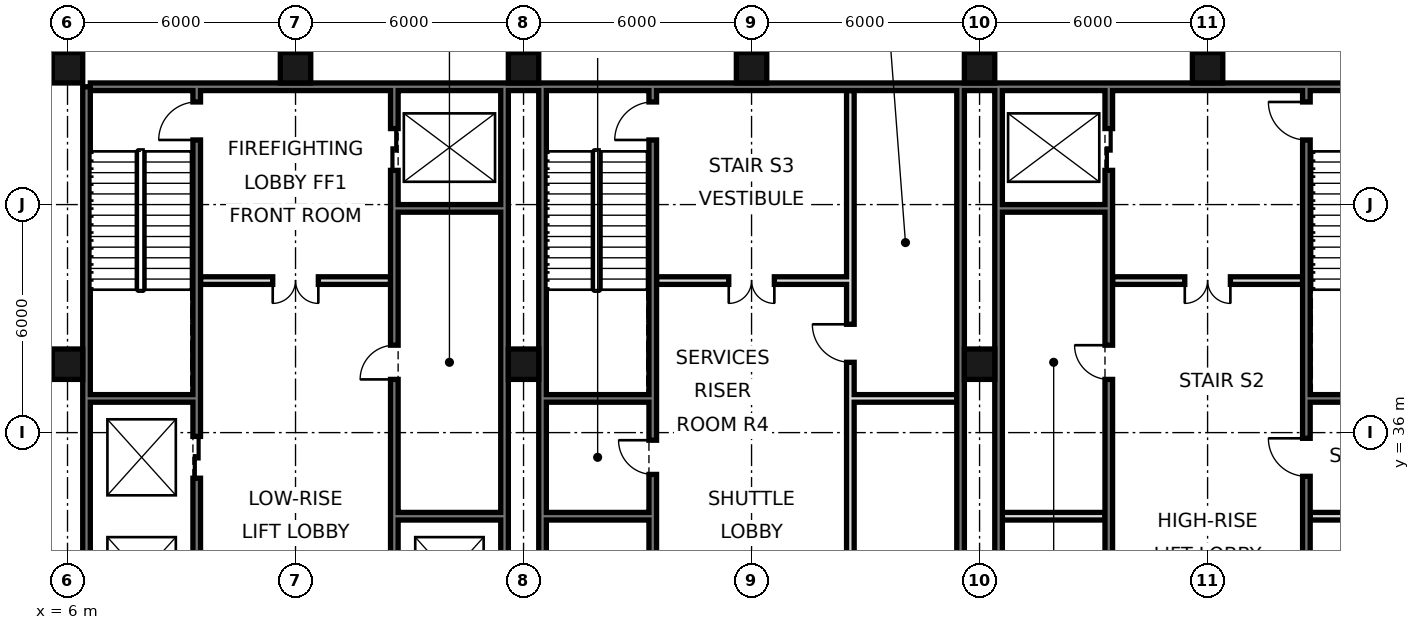
"""IFC4 building model, lengths in metres.
Left out: names, types, materials, properties, quantities, classifications, styles, units other than length and angle.
Written with IfcOpenShell. Run it as: python <this file> out.ifc"""

import sys

from ifc_helpers import new_model, si_unit, direction, frame, frame_2d, origin, origin_2d, place, context, subcontext, project, spatial, rectangle, hollow_rectangle, extrude, element, fill, save


model = new_model("IFC4")
c1 = context("Model", 3, precision=1e-05, world=origin(), true_north=direction((0.0, 1.0)))
c2 = subcontext(c1, "Body", "Model", "MODEL_VIEW")
j1 = project(units=[si_unit("LENGTHUNIT", "METRE"), si_unit("PLANEANGLEUNIT", "RADIAN")], contexts=[c1])
p1 = place(None, origin())
s1 = spatial("IfcSite", under=j1, at=p1, CompositionType="ELEMENT")
p2 = place(p1, origin())
s2 = spatial("IfcBuilding", under=s1, at=p2, CompositionType="ELEMENT")
p3 = place(p2, frame((0.0, 0.0, 34.8)))
s3 = spatial("IfcBuildingStorey", under=s2, at=p3, CompositionType="ELEMENT", Elevation=34.8)
for number, where, z_axis, x_axis in (
    (1, (6.0, 37.8, 0.0), (0.0, 0.0, 1.0), (1.0, 0.0, 0.0)),
    (2, (6.0, 45.6, 0.0), (0.0, 0.0, 1.0), (1.0, 0.0, 0.0)),
    (3, (12.0, 45.6, 0.0), (0.0, 0.0, 1.0), (1.0, 0.0, 0.0)),
    (4, (18.0, 37.8, 0.0), (0.0, 0.0, 1.0), (1.0, 0.0, 0.0)),
    (5, (18.0, 45.6, 0.0), (0.0, 0.0, 1.0), (1.0, 0.0, 0.0)),
    (6, (24.0, 45.6, 0.0), (0.0, 0.0, 1.0), (1.0, 0.0, 0.0)),
    (7, (30.0, 37.8, 0.0), (0.0, 0.0, 1.0), (1.0, 0.0, 0.0)),
    (8, (30.0, 45.6, 0.0), (0.0, 0.0, 1.0), (1.0, 0.0, 0.0)),
    (9, (36.0, 45.6, 0.0), (0.0, 0.0, 1.0), (1.0, 0.0, 0.0)),
):
    element("IfcColumn", number, at=place(p3, frame(where, z_axis=z_axis, x_axis=x_axis)), inside=s3, PredefinedType="COLUMN", context=c2, shape_type="SweptSolid", body=[
        extrude(hollow_rectangle(XDim=0.8, YDim=0.8, WallThickness=0.07, at=origin_2d()), origin(), (0.0, 0.0, 1.0), 4.8),
    ])
p4 = place(p3, frame((6.5, 21.6, 0.0), z_axis=(0.0, 0.0, 1.0), x_axis=(0.0, 1.0, 0.0)))
e10 = element("IfcWall", 10, at=p4, inside=s3, PredefinedType="SOLIDWALL", context=c2, shape_type="SweptSolid", body=[
    extrude(rectangle(XDim=23.5, YDim=0.2, at=frame_2d((11.75, 0.0))), origin(), (0.0, 0.0, 1.0), 4.4),
])
p5 = place(p3, frame((6.6, 45.1, 0.0), z_axis=(0.0, 0.0, 1.0), x_axis=(1.0, 0.0, 0.0)))
e11 = element("IfcWall", 11, at=p5, inside=s3, PredefinedType="SOLIDWALL", context=c2, shape_type="SweptSolid", body=[
    extrude(rectangle(XDim=34.8, YDim=0.2, at=frame_2d((17.4, 0.0))), origin(), (0.0, 0.0, 1.0), 4.4),
])
for number, where, z_axis, x_axis in (
    (12, (17.5, 27.6, 0.0), (0.0, 0.0, 1.0), (0.0, 1.0, 0.0)),
    (13, (18.5, 27.6, 0.0), (0.0, 0.0, 1.0), (0.0, 1.0, 0.0)),
    (14, (29.5, 27.6, 0.0), (0.0, 0.0, 1.0), (0.0, 1.0, 0.0)),
    (15, (30.5, 27.6, 0.0), (0.0, 0.0, 1.0), (0.0, 1.0, 0.0)),
):
    element("IfcWall", number, at=place(p3, frame(where, z_axis=z_axis, x_axis=x_axis)), inside=s3, PredefinedType="SOLIDWALL", context=c2, shape_type="SweptSolid", body=[
        extrude(rectangle(XDim=17.5, YDim=0.2, at=frame_2d((8.75, 0.0))), origin(), (0.0, 0.0, 1.0), 4.4),
    ])
p6 = place(p3, frame((14.6, 27.5, 0.0), z_axis=(0.0, 0.0, 1.0), x_axis=(0.0, 1.0, 0.0)))
e16 = element("IfcWall", 16, at=p6, inside=s3, PredefinedType="SOLIDWALL", context=c2, shape_type="SweptSolid", body=[
    extrude(rectangle(XDim=17.5, YDim=0.2, at=frame_2d((8.75, 0.0))), origin(), (0.0, 0.0, 1.0), 4.4),
])
p7 = place(p6, frame((1.1, 0.0, 0.0)))
e17 = element("IfcOpeningElement", 17, at=p7, cuts=e16, PredefinedType="OPENING", context=c2, shape_type="SweptSolid", body=[
    extrude(rectangle(XDim=1.1, YDim=2.1, at=frame_2d((0.55, 1.05))), frame((0.0, 0.11, 0.0), z_axis=(0.0, -1.0, 0.0), x_axis=(1.0, 0.0, 0.0)), (0.0, 0.0, 1.0), 0.22),
])
p8 = place(p6, frame((4.2, 0.0, 0.0)))
e18 = element("IfcOpeningElement", 18, at=p8, cuts=e16, PredefinedType="OPENING", context=c2, shape_type="SweptSolid", body=[
    extrude(rectangle(XDim=1.1, YDim=2.1, at=frame_2d((0.55, 1.05))), frame((0.0, 0.11, 0.0), z_axis=(0.0, -1.0, 0.0), x_axis=(1.0, 0.0, 0.0)), (0.0, 0.0, 1.0), 0.22),
])
p9 = place(p6, frame((15.4, 0.0, 0.0)))
e19 = element("IfcOpeningElement", 19, at=p9, cuts=e16, PredefinedType="OPENING", context=c2, shape_type="SweptSolid", body=[
    extrude(rectangle(XDim=1.1, YDim=2.1, at=frame_2d((0.55, 1.05))), frame((0.0, 0.11, 0.0), z_axis=(0.0, -1.0, 0.0), x_axis=(1.0, 0.0, 0.0)), (0.0, 0.0, 1.0), 0.22),
])
p10 = place(p6, frame((9.9, 0.0, 0.0)))
e20 = element("IfcOpeningElement", 20, at=p10, cuts=e16, PredefinedType="OPENING", context=c2, shape_type="SweptSolid", body=[
    extrude(rectangle(XDim=0.9, YDim=2.1, at=frame_2d((0.45, 1.05))), frame((0.0, 0.11, 0.0), z_axis=(0.0, -1.0, 0.0), x_axis=(1.0, 0.0, 0.0)), (0.0, 0.0, 1.0), 0.22),
])
p11 = place(p3, frame((21.4, 27.5, 0.0), z_axis=(0.0, 0.0, 1.0), x_axis=(0.0, 1.0, 0.0)))
e21 = element("IfcWall", 21, at=p11, inside=s3, PredefinedType="SOLIDWALL", context=c2, shape_type="SweptSolid", body=[
    extrude(rectangle(XDim=17.5, YDim=0.2, at=frame_2d((8.75, 0.0))), origin(), (0.0, 0.0, 1.0), 4.4),
])
p12 = place(p11, frame((16.2, 0.0, 0.0)))
e22 = element("IfcOpeningElement", 22, at=p12, cuts=e21, PredefinedType="OPENING", context=c2, shape_type="SweptSolid", body=[
    extrude(rectangle(XDim=1.0, YDim=2.1, at=frame_2d((0.5, 1.05))), frame((0.0, 0.11, 0.0), z_axis=(0.0, -1.0, 0.0), x_axis=(1.0, 0.0, 0.0)), (0.0, 0.0, 1.0), 0.22),
])
p13 = place(p11, frame((7.4, 0.0, 0.0)))
e23 = element("IfcOpeningElement", 23, at=p13, cuts=e21, PredefinedType="OPENING", context=c2, shape_type="SweptSolid", body=[
    extrude(rectangle(XDim=0.9, YDim=2.1, at=frame_2d((0.45, 1.05))), frame((0.0, 0.11, 0.0), z_axis=(0.0, -1.0, 0.0), x_axis=(1.0, 0.0, 0.0)), (0.0, 0.0, 1.0), 0.22),
])
p14 = place(p3, frame((26.6, 27.5, 0.0), z_axis=(0.0, 0.0, 1.0), x_axis=(0.0, 1.0, 0.0)))
e24 = element("IfcWall", 24, at=p14, inside=s3, PredefinedType="SOLIDWALL", context=c2, shape_type="SweptSolid", body=[
    extrude(rectangle(XDim=17.5, YDim=0.2, at=frame_2d((8.75, 0.0))), origin(), (0.0, 0.0, 1.0), 4.4),
])
p15 = place(p14, frame((4.3, 0.0, 0.0)))
e25 = element("IfcOpeningElement", 25, at=p15, cuts=e24, PredefinedType="OPENING", context=c2, shape_type="SweptSolid", body=[
    extrude(rectangle(XDim=0.9, YDim=2.1, at=frame_2d((0.45, 1.05))), frame((0.0, 0.11, 0.0), z_axis=(0.0, -1.0, 0.0), x_axis=(1.0, 0.0, 0.0)), (0.0, 0.0, 1.0), 0.22),
])
p16 = place(p14, frame((10.35, 0.0, 0.0)))
e26 = element("IfcOpeningElement", 26, at=p16, cuts=e24, PredefinedType="OPENING", context=c2, shape_type="SweptSolid", body=[
    extrude(rectangle(XDim=1.0, YDim=2.1, at=frame_2d((0.5, 1.05))), frame((0.0, 0.11, 0.0), z_axis=(0.0, -1.0, 0.0), x_axis=(1.0, 0.0, 0.0)), (0.0, 0.0, 1.0), 0.22),
])
p17 = place(p3, frame((33.4, 27.5, 0.0), z_axis=(0.0, 0.0, 1.0), x_axis=(0.0, 1.0, 0.0)))
e27 = element("IfcWall", 27, at=p17, inside=s3, PredefinedType="SOLIDWALL", context=c2, shape_type="SweptSolid", body=[
    extrude(rectangle(XDim=17.5, YDim=0.2, at=frame_2d((8.75, 0.0))), origin(), (0.0, 0.0, 1.0), 4.4),
])
p18 = place(p17, frame((15.4, 0.0, 0.0)))
e28 = element("IfcOpeningElement", 28, at=p18, cuts=e27, PredefinedType="OPENING", context=c2, shape_type="SweptSolid", body=[
    extrude(rectangle(XDim=1.1, YDim=2.1, at=frame_2d((0.55, 1.05))), frame((0.0, 0.11, 0.0), z_axis=(0.0, -1.0, 0.0), x_axis=(1.0, 0.0, 0.0)), (0.0, 0.0, 1.0), 0.22),
])
p19 = place(p17, frame((2.7, 0.0, 0.0)))
e29 = element("IfcOpeningElement", 29, at=p19, cuts=e27, PredefinedType="OPENING", context=c2, shape_type="SweptSolid", body=[
    extrude(rectangle(XDim=1.0, YDim=2.1, at=frame_2d((0.5, 1.05))), frame((0.0, 0.11, 0.0), z_axis=(0.0, -1.0, 0.0), x_axis=(1.0, 0.0, 0.0)), (0.0, 0.0, 1.0), 0.22),
])
p20 = place(p17, frame((9.9, 0.0, 0.0)))
e30 = element("IfcOpeningElement", 30, at=p20, cuts=e27, PredefinedType="OPENING", context=c2, shape_type="SweptSolid", body=[
    extrude(rectangle(XDim=0.9, YDim=2.1, at=frame_2d((0.45, 1.05))), frame((0.0, 0.11, 0.0), z_axis=(0.0, -1.0, 0.0), x_axis=(1.0, 0.0, 0.0)), (0.0, 0.0, 1.0), 0.22),
])
p21 = place(p3, frame((38.6, 21.6, 0.0), z_axis=(0.0, 0.0, 1.0), x_axis=(0.0, 1.0, 0.0)))
e31 = element("IfcWall", 31, at=p21, inside=s3, PredefinedType="SOLIDWALL", context=c2, shape_type="SweptSolid", body=[
    extrude(rectangle(XDim=23.4, YDim=0.2, at=frame_2d((11.7, 0.0))), origin(), (0.0, 0.0, 1.0), 4.4),
])
p22 = place(p21, frame((8.6, 0.0, 0.0)))
e32 = element("IfcOpeningElement", 32, at=p22, cuts=e31, PredefinedType="OPENING", context=c2, shape_type="SweptSolid", body=[
    extrude(rectangle(XDim=1.0, YDim=2.1, at=frame_2d((0.5, 1.05))), frame((0.0, 0.11, 0.0), z_axis=(0.0, -1.0, 0.0), x_axis=(1.0, 0.0, 0.0)), (0.0, 0.0, 1.0), 0.22),
])
p23 = place(p21, frame((13.25, 0.0, 0.0)))
e33 = element("IfcOpeningElement", 33, at=p23, cuts=e31, PredefinedType="OPENING", context=c2, shape_type="SweptSolid", body=[
    extrude(rectangle(XDim=1.0, YDim=2.1, at=frame_2d((0.5, 1.05))), frame((0.0, 0.11, 0.0), z_axis=(0.0, -1.0, 0.0), x_axis=(1.0, 0.0, 0.0)), (0.0, 0.0, 1.0), 0.22),
])
p24 = place(p21, frame((22.1, 0.0, 0.0)))
e34 = element("IfcOpeningElement", 34, at=p24, cuts=e31, PredefinedType="OPENING", context=c2, shape_type="SweptSolid", body=[
    extrude(rectangle(XDim=1.0, YDim=2.1, at=frame_2d((0.5, 1.05))), frame((0.0, 0.11, 0.0), z_axis=(0.0, -1.0, 0.0), x_axis=(1.0, 0.0, 0.0)), (0.0, 0.0, 1.0), 0.22),
])
p25 = place(p21, frame((0.175, 0.0, 0.0)))
e35 = element("IfcOpeningElement", 35, at=p25, cuts=e31, PredefinedType="OPENING", context=c2, shape_type="SweptSolid", body=[
    extrude(rectangle(XDim=0.9, YDim=2.1, at=frame_2d((0.45, 1.05))), frame((0.0, 0.11, 0.0), z_axis=(0.0, -1.0, 0.0), x_axis=(1.0, 0.0, 0.0)), (0.0, 0.0, 1.0), 0.22),
])
p26 = place(p3, frame((9.4, 21.6, 0.0), z_axis=(0.0, 0.0, 1.0), x_axis=(0.0, 1.0, 0.0)))
e36 = element("IfcWall", 36, at=p26, inside=s3, PredefinedType="SOLIDWALL", context=c2, shape_type="SweptSolid", body=[
    extrude(rectangle(XDim=23.4, YDim=0.2, at=frame_2d((11.7, 0.0))), origin(), (0.0, 0.0, 1.0), 4.4),
])
p27 = place(p26, frame((7.0, 0.0, 0.0)))
e37 = element("IfcOpeningElement", 37, at=p27, cuts=e36, PredefinedType="OPENING", context=c2, shape_type="SweptSolid", body=[
    extrude(rectangle(XDim=1.1, YDim=2.1, at=frame_2d((0.55, 1.05))), frame((0.0, 0.11, 0.0), z_axis=(0.0, -1.0, 0.0), x_axis=(1.0, 0.0, 0.0)), (0.0, 0.0, 1.0), 0.22),
])
p28 = place(p26, frame((10.1, 0.0, 0.0)))
e38 = element("IfcOpeningElement", 38, at=p28, cuts=e36, PredefinedType="OPENING", context=c2, shape_type="SweptSolid", body=[
    extrude(rectangle(XDim=1.1, YDim=2.1, at=frame_2d((0.55, 1.05))), frame((0.0, 0.11, 0.0), z_axis=(0.0, -1.0, 0.0), x_axis=(1.0, 0.0, 0.0)), (0.0, 0.0, 1.0), 0.22),
])
p29 = place(p26, frame((13.2, 0.0, 0.0)))
e39 = element("IfcOpeningElement", 39, at=p29, cuts=e36, PredefinedType="OPENING", context=c2, shape_type="SweptSolid", body=[
    extrude(rectangle(XDim=1.1, YDim=2.1, at=frame_2d((0.55, 1.05))), frame((0.0, 0.11, 0.0), z_axis=(0.0, -1.0, 0.0), x_axis=(1.0, 0.0, 0.0)), (0.0, 0.0, 1.0), 0.22),
])
p30 = place(p26, frame((22.1, 0.0, 0.0)))
e40 = element("IfcOpeningElement", 40, at=p30, cuts=e36, PredefinedType="OPENING", context=c2, shape_type="SweptSolid", body=[
    extrude(rectangle(XDim=1.0, YDim=2.1, at=frame_2d((0.5, 1.05))), frame((0.0, 0.11, 0.0), z_axis=(0.0, -1.0, 0.0), x_axis=(1.0, 0.0, 0.0)), (0.0, 0.0, 1.0), 0.22),
])
p31 = place(p26, frame((0.175, 0.0, 0.0)))
e41 = element("IfcOpeningElement", 41, at=p31, cuts=e36, PredefinedType="OPENING", context=c2, shape_type="SweptSolid", body=[
    extrude(rectangle(XDim=0.9, YDim=2.1, at=frame_2d((0.45, 1.05))), frame((0.0, 0.11, 0.0), z_axis=(0.0, -1.0, 0.0), x_axis=(1.0, 0.0, 0.0)), (0.0, 0.0, 1.0), 0.22),
])
for number, where, z_axis, x_axis in (
    (42, (14.7, 33.8, 0.0), (0.0, 0.0, 1.0), (1.0, 0.0, 0.0)),
    (43, (18.6, 33.8, 0.0), (0.0, 0.0, 1.0), (1.0, 0.0, 0.0)),
    (44, (30.6, 33.8, 0.0), (0.0, 0.0, 1.0), (1.0, 0.0, 0.0)),
):
    element("IfcWall", number, at=place(p3, frame(where, z_axis=z_axis, x_axis=x_axis)), inside=s3, PredefinedType="SOLIDWALL", context=c2, shape_type="SweptSolid", body=[
        extrude(rectangle(XDim=2.7, YDim=0.2, at=frame_2d((1.35, 0.0))), origin(), (0.0, 0.0, 1.0), 4.4),
    ])
p32 = place(p3, frame((38.7, 33.8, 0.0), z_axis=(0.0, 0.0, 1.0), x_axis=(1.0, 0.0, 0.0)))
e45 = element("IfcWall", 45, at=p32, inside=s3, PredefinedType="PARTITIONING", context=c2, shape_type="SweptSolid", body=[
    extrude(rectangle(XDim=2.7, YDim=0.2, at=frame_2d((1.35, 0.0))), origin(), (0.0, 0.0, 1.0), 4.4),
])
for number, where, z_axis, x_axis in (
    (46, (18.6, 36.9, 0.0), (0.0, 0.0, 1.0), (1.0, 0.0, 0.0)),
    (47, (26.7, 36.9, 0.0), (0.0, 0.0, 1.0), (1.0, 0.0, 0.0)),
    (48, (38.7, 36.9, 0.0), (0.0, 0.0, 1.0), (1.0, 0.0, 0.0)),
    (49, (6.6, 36.9, 0.0), (0.0, 0.0, 1.0), (1.0, 0.0, 0.0)),
):
    element("IfcWall", number, at=place(p3, frame(where, z_axis=z_axis, x_axis=x_axis)), inside=s3, PredefinedType="SOLIDWALL", context=c2, shape_type="SweptSolid", body=[
        extrude(rectangle(XDim=2.7, YDim=0.2, at=frame_2d((1.35, 0.0))), origin(), (0.0, 0.0, 1.0), 4.4),
    ])
p33 = place(p3, frame((21.5, 40.0, 0.0), z_axis=(0.0, 0.0, 1.0), x_axis=(1.0, 0.0, 0.0)))
e50 = element("IfcWall", 50, at=p33, inside=s3, PredefinedType="PARTITIONING", context=c2, shape_type="SweptSolid", body=[
    extrude(rectangle(XDim=5.0, YDim=0.2, at=frame_2d((2.5, 0.0))), origin(), (0.0, 0.0, 1.0), 4.4),
])
p34 = place(p33, frame((1.9, 0.0, 0.0)))
e51 = element("IfcOpeningElement", 51, at=p34, cuts=e50, PredefinedType="OPENING", context=c2, shape_type="SweptSolid", body=[
    extrude(rectangle(XDim=1.2, YDim=2.1, at=frame_2d((0.6, 1.05))), frame((0.0, 0.11, 0.0), z_axis=(0.0, -1.0, 0.0), x_axis=(1.0, 0.0, 0.0)), (0.0, 0.0, 1.0), 0.22),
])
p35 = place(p3, frame((33.5, 40.0, 0.0), z_axis=(0.0, 0.0, 1.0), x_axis=(1.0, 0.0, 0.0)))
e52 = element("IfcWall", 52, at=p35, inside=s3, PredefinedType="PARTITIONING", context=c2, shape_type="SweptSolid", body=[
    extrude(rectangle(XDim=5.0, YDim=0.2, at=frame_2d((2.5, 0.0))), origin(), (0.0, 0.0, 1.0), 4.4),
])
p36 = place(p35, frame((1.9, 0.0, 0.0)))
e53 = element("IfcOpeningElement", 53, at=p36, cuts=e52, PredefinedType="OPENING", context=c2, shape_type="SweptSolid", body=[
    extrude(rectangle(XDim=1.2, YDim=2.1, at=frame_2d((0.6, 1.05))), frame((0.0, 0.11, 0.0), z_axis=(0.0, -1.0, 0.0), x_axis=(1.0, 0.0, 0.0)), (0.0, 0.0, 1.0), 0.22),
])
p37 = place(p3, frame((9.5, 40.0, 0.0), z_axis=(0.0, 0.0, 1.0), x_axis=(1.0, 0.0, 0.0)))
e54 = element("IfcWall", 54, at=p37, inside=s3, PredefinedType="PARTITIONING", context=c2, shape_type="SweptSolid", body=[
    extrude(rectangle(XDim=5.0, YDim=0.2, at=frame_2d((2.5, 0.0))), origin(), (0.0, 0.0, 1.0), 4.4),
])
p38 = place(p37, frame((1.9, 0.0, 0.0)))
e55 = element("IfcOpeningElement", 55, at=p38, cuts=e54, PredefinedType="OPENING", context=c2, shape_type="SweptSolid", body=[
    extrude(rectangle(XDim=1.2, YDim=2.1, at=frame_2d((0.6, 1.05))), frame((0.0, 0.11, 0.0), z_axis=(0.0, -1.0, 0.0), x_axis=(1.0, 0.0, 0.0)), (0.0, 0.0, 1.0), 0.22),
])
for number, where, z_axis, x_axis in (
    (56, (14.7, 41.9, 0.0), (0.0, 0.0, 1.0), (1.0, 0.0, 0.0)),
    (57, (30.6, 41.9, 0.0), (0.0, 0.0, 1.0), (1.0, 0.0, 0.0)),
):
    element("IfcWall", number, at=place(p3, frame(where, z_axis=z_axis, x_axis=x_axis)), inside=s3, PredefinedType="SOLIDWALL", context=c2, shape_type="SweptSolid", body=[
        extrude(rectangle(XDim=2.7, YDim=0.2, at=frame_2d((1.35, 0.0))), origin(), (0.0, 0.0, 1.0), 4.4),
    ])
p39 = place(p38, frame((1.2, 0.0, 0.0), z_axis=(0.0, 0.0, 1.0), x_axis=(-1.0, 0.0, 0.0)))
e58 = element("IfcDoor", 58, at=p39, inside=s3, OperationType="DOUBLE_DOOR_SINGLE_SWING", PredefinedType="DOOR", context=c2, shape_type="SweptSolid", body=[
    extrude(rectangle(XDim=1.2, YDim=2.1, at=frame_2d((0.6, 1.05))), frame((0.0, 0.025, 0.0), z_axis=(0.0, -1.0, 0.0), x_axis=(1.0, 0.0, 0.0)), (0.0, 0.0, 1.0), 0.05),
])
fill(e55, e58)
p40 = place(p34, frame((1.2, 0.0, 0.0), z_axis=(0.0, 0.0, 1.0), x_axis=(-1.0, 0.0, 0.0)))
e59 = element("IfcDoor", 59, at=p40, inside=s3, OperationType="DOUBLE_DOOR_SINGLE_SWING", PredefinedType="DOOR", context=c2, shape_type="SweptSolid", body=[
    extrude(rectangle(XDim=1.2, YDim=2.1, at=frame_2d((0.6, 1.05))), frame((0.0, 0.025, 0.0), z_axis=(0.0, -1.0, 0.0), x_axis=(1.0, 0.0, 0.0)), (0.0, 0.0, 1.0), 0.05),
])
fill(e51, e59)
p41 = place(p36, frame((1.2, 0.0, 0.0), z_axis=(0.0, 0.0, 1.0), x_axis=(-1.0, 0.0, 0.0)))
e60 = element("IfcDoor", 60, at=p41, inside=s3, OperationType="DOUBLE_DOOR_SINGLE_SWING", PredefinedType="DOOR", context=c2, shape_type="SweptSolid", body=[
    extrude(rectangle(XDim=1.2, YDim=2.1, at=frame_2d((0.6, 1.05))), frame((0.0, 0.025, 0.0), z_axis=(0.0, -1.0, 0.0), x_axis=(1.0, 0.0, 0.0)), (0.0, 0.0, 1.0), 0.05),
])
fill(e53, e60)
p42 = place(p18, origin())
e61 = element("IfcDoor", 61, at=p42, inside=s3, OperationType="DOUBLE_DOOR_SLIDING", PredefinedType="DOOR", context=c2, shape_type="SweptSolid", body=[
    extrude(rectangle(XDim=1.1, YDim=2.1, at=frame_2d((0.55, 1.05))), frame((0.0, 0.025, 0.0), z_axis=(0.0, -1.0, 0.0), x_axis=(1.0, 0.0, 0.0)), (0.0, 0.0, 1.0), 0.05),
])
fill(e28, e61)
p43 = place(p9, origin())
e62 = element("IfcDoor", 62, at=p43, inside=s3, OperationType="DOUBLE_DOOR_SLIDING", PredefinedType="DOOR", context=c2, shape_type="SweptSolid", body=[
    extrude(rectangle(XDim=1.1, YDim=2.1, at=frame_2d((0.55, 1.05))), frame((0.0, 0.025, 0.0), z_axis=(0.0, -1.0, 0.0), x_axis=(1.0, 0.0, 0.0)), (0.0, 0.0, 1.0), 0.05),
])
fill(e19, e62)
p44 = place(p29, origin())
e63 = element("IfcDoor", 63, at=p44, inside=s3, OperationType="DOUBLE_DOOR_SLIDING", PredefinedType="DOOR", context=c2, shape_type="SweptSolid", body=[
    extrude(rectangle(XDim=1.1, YDim=2.1, at=frame_2d((0.55, 1.05))), frame((0.0, 0.025, 0.0), z_axis=(0.0, -1.0, 0.0), x_axis=(1.0, 0.0, 0.0)), (0.0, 0.0, 1.0), 0.05),
])
fill(e39, e63)
p45 = place(p23, frame((1.0, 0.0, 0.0), z_axis=(0.0, 0.0, 1.0), x_axis=(-1.0, 0.0, 0.0)))
e64 = element("IfcDoor", 64, at=p45, inside=s3, OperationType="SINGLE_SWING_LEFT", PredefinedType="DOOR", context=c2, shape_type="SweptSolid", body=[
    extrude(rectangle(XDim=1.0, YDim=2.1, at=frame_2d((0.5, 1.05))), frame((0.0, 0.025, 0.0), z_axis=(0.0, -1.0, 0.0), x_axis=(1.0, 0.0, 0.0)), (0.0, 0.0, 1.0), 0.05),
])
fill(e33, e64)
p46 = place(p30, origin())
e65 = element("IfcDoor", 65, at=p46, inside=s3, OperationType="SINGLE_SWING_LEFT", PredefinedType="DOOR", context=c2, shape_type="SweptSolid", body=[
    extrude(rectangle(XDim=1.0, YDim=2.1, at=frame_2d((0.5, 1.05))), frame((0.0, 0.025, 0.0), z_axis=(0.0, -1.0, 0.0), x_axis=(1.0, 0.0, 0.0)), (0.0, 0.0, 1.0), 0.05),
])
fill(e40, e65)
p47 = place(p24, frame((1.0, 0.0, 0.0), z_axis=(0.0, 0.0, 1.0), x_axis=(-1.0, 0.0, 0.0)))
e66 = element("IfcDoor", 66, at=p47, inside=s3, OperationType="SINGLE_SWING_LEFT", PredefinedType="DOOR", context=c2, shape_type="SweptSolid", body=[
    extrude(rectangle(XDim=1.0, YDim=2.1, at=frame_2d((0.5, 1.05))), frame((0.0, 0.025, 0.0), z_axis=(0.0, -1.0, 0.0), x_axis=(1.0, 0.0, 0.0)), (0.0, 0.0, 1.0), 0.05),
])
fill(e34, e66)
p48 = place(p12, origin())
e67 = element("IfcDoor", 67, at=p48, inside=s3, OperationType="SINGLE_SWING_LEFT", PredefinedType="DOOR", context=c2, shape_type="SweptSolid", body=[
    extrude(rectangle(XDim=1.0, YDim=2.1, at=frame_2d((0.5, 1.05))), frame((0.0, 0.025, 0.0), z_axis=(0.0, -1.0, 0.0), x_axis=(1.0, 0.0, 0.0)), (0.0, 0.0, 1.0), 0.05),
])
fill(e22, e67)
p49 = place(p10, origin())
e68 = element("IfcDoor", 68, at=p49, inside=s3, OperationType="SINGLE_SWING_LEFT", PredefinedType="DOOR", context=c2, shape_type="SweptSolid", body=[
    extrude(rectangle(XDim=0.9, YDim=2.1, at=frame_2d((0.45, 1.05))), frame((0.0, 0.025, 0.0), z_axis=(0.0, -1.0, 0.0), x_axis=(1.0, 0.0, 0.0)), (0.0, 0.0, 1.0), 0.05),
])
fill(e20, e68)
p50 = place(p20, frame((0.9, 0.0, 0.0), z_axis=(0.0, 0.0, 1.0), x_axis=(-1.0, 0.0, 0.0)))
e69 = element("IfcDoor", 69, at=p50, inside=s3, OperationType="SINGLE_SWING_LEFT", PredefinedType="DOOR", context=c2, shape_type="SweptSolid", body=[
    extrude(rectangle(XDim=0.9, YDim=2.1, at=frame_2d((0.45, 1.05))), frame((0.0, 0.025, 0.0), z_axis=(0.0, -1.0, 0.0), x_axis=(1.0, 0.0, 0.0)), (0.0, 0.0, 1.0), 0.05),
])
fill(e30, e69)
p51 = place(p13, frame((0.9, 0.0, 0.0), z_axis=(0.0, 0.0, 1.0), x_axis=(-1.0, 0.0, 0.0)))
e70 = element("IfcDoor", 70, at=p51, inside=s3, OperationType="SINGLE_SWING_LEFT", PredefinedType="DOOR", context=c2, shape_type="SweptSolid", body=[
    extrude(rectangle(XDim=0.9, YDim=2.1, at=frame_2d((0.45, 1.05))), frame((0.0, 0.025, 0.0), z_axis=(0.0, -1.0, 0.0), x_axis=(1.0, 0.0, 0.0)), (0.0, 0.0, 1.0), 0.05),
])
fill(e23, e70)
p52 = place(p16, frame((1.0, 0.0, 0.0), z_axis=(0.0, 0.0, 1.0), x_axis=(-1.0, 0.0, 0.0)))
e71 = element("IfcDoor", 71, at=p52, inside=s3, OperationType="SINGLE_SWING_LEFT", PredefinedType="DOOR", context=c2, shape_type="SweptSolid", body=[
    extrude(rectangle(XDim=1.0, YDim=2.1, at=frame_2d((0.5, 1.05))), frame((0.0, 0.025, 0.0), z_axis=(0.0, -1.0, 0.0), x_axis=(1.0, 0.0, 0.0)), (0.0, 0.0, 1.0), 0.05),
])
fill(e26, e71)
save(model, sys.argv[1])
